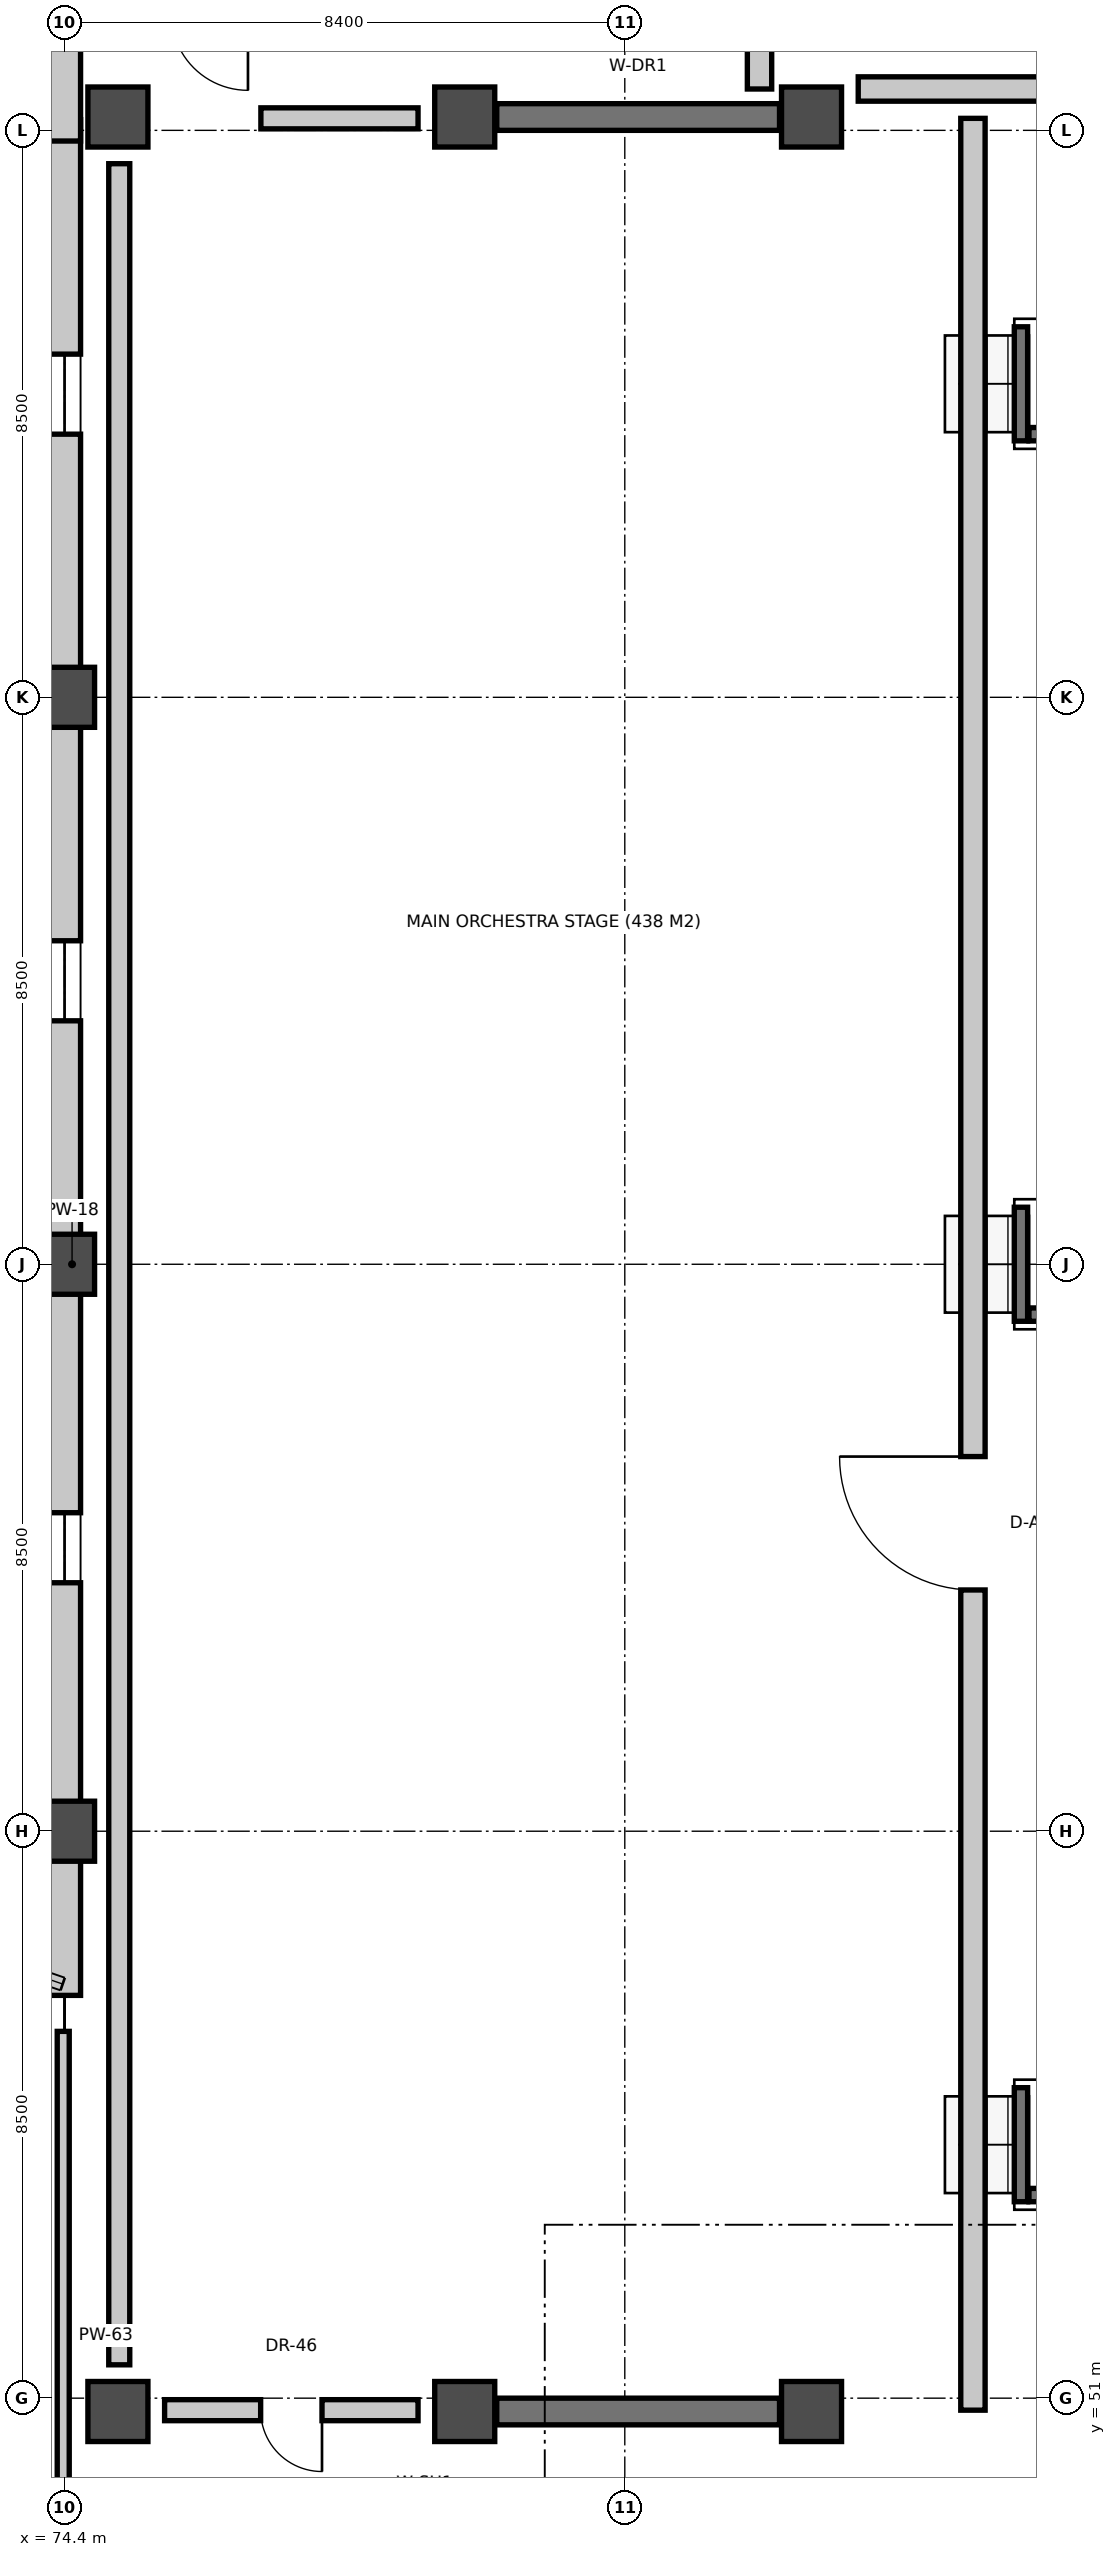
"""IFC4 building model, lengths in metres.
Left out: names, types, materials, properties, quantities, classifications, styles, units other than length and angle.
Written with IfcOpenShell. Run it as: python <this file> out.ifc"""

import sys

from ifc_helpers import new_model, si_unit, direction, frame, frame_2d, origin, origin_2d, place, context, subcontext, project, spatial, rectangle, extrude, element, fill, save


model = new_model("IFC4")
c1 = context("Model", 3, precision=1e-05, world=origin(), true_north=direction((0.0, 1.0)))
c2 = subcontext(c1, "Body", "Model", "MODEL_VIEW")
j1 = project(units=[si_unit("LENGTHUNIT", "METRE"), si_unit("PLANEANGLEUNIT", "RADIAN")], contexts=[c1])
p1 = place(None, origin())
s1 = spatial("IfcSite", under=j1, at=p1, CompositionType="ELEMENT")
p2 = place(p1, origin())
s2 = spatial("IfcBuilding", under=s1, at=p2, CompositionType="ELEMENT")
p3 = place(p2, frame((0.0, 0.0, 5.4)))
s3 = spatial("IfcBuildingStorey", under=s2, at=p3, CompositionType="ELEMENT", Elevation=5.4)
for number, where, z_axis, x_axis in (
    (1, (74.4, 59.5, 0.0), (0.0, 0.0, 1.0), (1.0, 0.0, 0.0)),
    (2, (74.4, 68.0, 0.0), (0.0, 0.0, 1.0), (1.0, 0.0, 0.0)),
    (3, (74.4, 76.5, 0.0), (0.0, 0.0, 1.0), (1.0, 0.0, 0.0)),
    (4, (75.2, 50.8, 0.0), (0.0, 0.0, 1.0), (1.0, 0.0, 0.0)),
    (5, (75.2, 85.2, 0.0), (0.0, 0.0, 1.0), (1.0, 0.0, 0.0)),
    (6, (80.4, 50.8, 0.0), (0.0, 0.0, 1.0), (1.0, 0.0, 0.0)),
    (7, (80.4, 85.2, 0.0), (0.0, 0.0, 1.0), (1.0, 0.0, 0.0)),
    (8, (85.6, 50.8, 0.0), (0.0, 0.0, 1.0), (1.0, 0.0, 0.0)),
    (9, (85.6, 85.2, 0.0), (0.0, 0.0, 1.0), (1.0, 0.0, 0.0)),
):
    element("IfcColumn", number, at=place(p3, frame(where, z_axis=z_axis, x_axis=x_axis)), inside=s3, PredefinedType="COLUMN", context=c2, shape_type="SweptSolid", body=[
        extrude(rectangle(XDim=0.9, YDim=0.9, at=origin_2d()), origin(), (0.0, 0.0, 1.0), 4.8),
    ])
for number, where, z_axis, x_axis in (
    (10, (80.88, 50.8, 0.0), (0.0, 0.0, 1.0), (1.0, 0.0, 0.0)),
    (11, (80.88, 85.2, 0.0), (0.0, 0.0, 1.0), (1.0, 0.0, 0.0)),
):
    element("IfcWall", number, at=place(p3, frame(where, z_axis=z_axis, x_axis=x_axis)), inside=s3, PredefinedType="SHEAR", context=c2, shape_type="SweptSolid", body=[
        extrude(rectangle(XDim=4.24, YDim=0.4, at=frame_2d((2.12, 0.0))), origin(), (0.0, 0.0, 1.0), 3.48),
    ])
p4 = place(p3, frame((68.654, 59.182, 0.0), z_axis=(0.0, 0.0, 1.0), x_axis=(0.945267933336, -0.326295164241, 0.0)))
e12 = element("IfcWall", 12, at=p4, inside=s3, PredefinedType="PARAPET", context=c2, shape_type="SweptSolid", body=[
    extrude(rectangle(XDim=6.079, YDim=0.26, at=frame_2d((3.039, 0.0))), origin(), (0.0, 0.0, 1.0), 1.12),
])
p5 = place(p3, frame((74.4, 57.039, 0.0), z_axis=(0.0, 0.0, 1.0), x_axis=(0.0, 1.0, 0.0)))
e13 = element("IfcWall", 13, at=p5, inside=s3, PredefinedType="SOLIDWALL", context=c2, shape_type="SweptSolid", body=[
    extrude(rectangle(XDim=2.031, YDim=0.48, at=frame_2d((1.016, 0.0))), origin(), (0.0, 0.0, 1.0), 4.53),
])
p6 = place(p3, frame((74.4, 59.93, 0.0), z_axis=(0.0, 0.0, 1.0), x_axis=(0.0, 1.0, 0.0)))
e14 = element("IfcWall", 14, at=p6, inside=s3, PredefinedType="SOLIDWALL", context=c2, shape_type="SweptSolid", body=[
    extrude(rectangle(XDim=7.64, YDim=0.48, at=frame_2d((3.82, 0.0))), origin(), (0.0, 0.0, 1.0), 3.424),
])
p7 = place(p6, frame((3.295, 0.0, 0.95)))
e15 = element("IfcOpeningElement", 15, at=p7, cuts=e14, PredefinedType="OPENING", context=c2, shape_type="SweptSolid", body=[
    extrude(rectangle(XDim=1.05, YDim=1.8, at=frame_2d((0.525, 0.9))), frame((0.0, 0.25, 0.0), z_axis=(0.0, -1.0, 0.0), x_axis=(1.0, 0.0, 0.0)), (0.0, 0.0, 1.0), 0.5),
])
p8 = place(p3, frame((74.4, 68.43, 0.0), z_axis=(0.0, 0.0, 1.0), x_axis=(0.0, 1.0, 0.0)))
e16 = element("IfcWall", 16, at=p8, inside=s3, PredefinedType="SOLIDWALL", context=c2, shape_type="SweptSolid", body=[
    extrude(rectangle(XDim=7.64, YDim=0.48, at=frame_2d((3.82, 0.0))), origin(), (0.0, 0.0, 1.0), 3.736),
])
p9 = place(p8, frame((3.22, 0.0, 0.95)))
e17 = element("IfcOpeningElement", 17, at=p9, cuts=e16, PredefinedType="OPENING", context=c2, shape_type="SweptSolid", body=[
    extrude(rectangle(XDim=1.2, YDim=2.4, at=frame_2d((0.6, 1.2))), frame((0.0, 0.25, 0.0), z_axis=(0.0, -1.0, 0.0), x_axis=(1.0, 0.0, 0.0)), (0.0, 0.0, 1.0), 0.5),
])
p10 = place(p3, frame((74.4, 76.93, 0.0), z_axis=(0.0, 0.0, 1.0), x_axis=(0.0, 1.0, 0.0)))
e18 = element("IfcWall", 18, at=p10, inside=s3, PredefinedType="SOLIDWALL", context=c2, shape_type="SweptSolid", body=[
    extrude(rectangle(XDim=8.23, YDim=0.48, at=frame_2d((4.115, 0.0))), origin(), (0.0, 0.0, 1.0), 4.53),
])
p11 = place(p10, frame((3.515, 0.0, 0.95)))
e19 = element("IfcOpeningElement", 19, at=p11, cuts=e18, PredefinedType="OPENING", context=c2, shape_type="SweptSolid", body=[
    extrude(rectangle(XDim=1.2, YDim=2.4, at=frame_2d((0.6, 1.2))), frame((0.0, 0.25, 0.0), z_axis=(0.0, -1.0, 0.0), x_axis=(1.0, 0.0, 0.0)), (0.0, 0.0, 1.0), 0.5),
])
p12 = place(p3, frame((74.4, 84.84, 0.0), z_axis=(0.0, 0.0, 1.0), x_axis=(0.0, 1.0, 0.0)))
e20 = element("IfcWall", 20, at=p12, inside=s3, PredefinedType="SOLIDWALL", context=c2, shape_type="SweptSolid", body=[
    extrude(rectangle(XDim=8.23, YDim=0.48, at=frame_2d((4.115, 0.0))), origin(), (0.0, 0.0, 1.0), 4.53),
])
p13 = place(p12, frame((3.515, 0.0, 0.95)))
e21 = element("IfcOpeningElement", 21, at=p13, cuts=e20, PredefinedType="OPENING", context=c2, shape_type="SweptSolid", body=[
    extrude(rectangle(XDim=1.2, YDim=2.4, at=frame_2d((0.6, 1.2))), frame((0.0, 0.25, 0.0), z_axis=(0.0, -1.0, 0.0), x_axis=(1.0, 0.0, 0.0)), (0.0, 0.0, 1.0), 0.5),
])
p14 = place(p3, frame((88.74, 53.945, 0.0), z_axis=(0.0, 0.0, 1.0), x_axis=(0.0, 1.0, 0.0)))
e22 = element("IfcWall", 22, at=p14, inside=s3, PredefinedType="SHEAR", context=c2, shape_type="SweptSolid", body=[
    extrude(rectangle(XDim=1.71, YDim=0.2, at=frame_2d((0.855, 0.0))), origin(), (0.0, 0.0, 1.0), 0.225),
])
p15 = place(p3, frame((88.86, 54.045, 0.0), z_axis=(0.0, 0.0, 1.0), x_axis=(1.0, 0.0, 0.0)))
e23 = element("IfcWall", 23, at=p15, inside=s3, PredefinedType="SHEAR", context=c2, shape_type="SweptSolid", body=[
    extrude(rectangle(XDim=0.83, YDim=0.2, at=frame_2d((0.415, 0.0))), origin(), (0.0, 0.0, 1.0), 0.225),
])
p16 = place(p3, frame((88.74, 67.145, 0.0), z_axis=(0.0, 0.0, 1.0), x_axis=(0.0, 1.0, 0.0)))
e24 = element("IfcWall", 24, at=p16, inside=s3, PredefinedType="SHEAR", context=c2, shape_type="SweptSolid", body=[
    extrude(rectangle(XDim=1.71, YDim=0.2, at=frame_2d((0.855, 0.0))), origin(), (0.0, 0.0, 1.0), 0.225),
])
p17 = place(p3, frame((88.86, 67.245, 0.0), z_axis=(0.0, 0.0, 1.0), x_axis=(1.0, 0.0, 0.0)))
e25 = element("IfcWall", 25, at=p17, inside=s3, PredefinedType="SHEAR", context=c2, shape_type="SweptSolid", body=[
    extrude(rectangle(XDim=0.83, YDim=0.2, at=frame_2d((0.415, 0.0))), origin(), (0.0, 0.0, 1.0), 0.225),
])
p18 = place(p3, frame((88.74, 80.345, 0.0), z_axis=(0.0, 0.0, 1.0), x_axis=(0.0, 1.0, 0.0)))
e26 = element("IfcWall", 26, at=p18, inside=s3, PredefinedType="SHEAR", context=c2, shape_type="SweptSolid", body=[
    extrude(rectangle(XDim=1.71, YDim=0.2, at=frame_2d((0.855, 0.0))), origin(), (0.0, 0.0, 1.0), 0.225),
])
p19 = place(p3, frame((88.86, 80.445, 0.0), z_axis=(0.0, 0.0, 1.0), x_axis=(1.0, 0.0, 0.0)))
e27 = element("IfcWall", 27, at=p19, inside=s3, PredefinedType="SHEAR", context=c2, shape_type="SweptSolid", body=[
    extrude(rectangle(XDim=0.83, YDim=0.2, at=frame_2d((0.415, 0.0))), origin(), (0.0, 0.0, 1.0), 0.225),
])
p20 = place(p3, frame((88.02, 50.82, 0.0), z_axis=(0.0, 0.0, 1.0), x_axis=(0.0, 1.0, 0.0)))
e28 = element("IfcWall", 28, at=p20, inside=s3, PredefinedType="PARTITIONING", context=c2, shape_type="SweptSolid", body=[
    extrude(rectangle(XDim=34.36, YDim=0.365, at=frame_2d((17.18, 0.0))), origin(), (0.0, 0.0, 1.0), 3.45),
])
p21 = place(p20, frame((12.297, 0.0, 0.0)))
e29 = element("IfcOpeningElement", 29, at=p21, cuts=e28, PredefinedType="OPENING", context=c2, shape_type="SweptSolid", body=[
    extrude(rectangle(XDim=2.0, YDim=2.4, at=frame_2d((1.0, 1.2))), frame((0.0, 0.192, 0.0), z_axis=(0.0, -1.0, 0.0), x_axis=(1.0, 0.0, 0.0)), (0.0, 0.0, 1.0), 0.385),
])
p22 = place(p3, frame((75.22, 51.5, 0.0), z_axis=(0.0, 0.0, 1.0), x_axis=(0.0, 1.0, 0.0)))
e30 = element("IfcWall", 30, at=p22, inside=s3, PredefinedType="PARTITIONING", context=c2, shape_type="SweptSolid", body=[
    extrude(rectangle(XDim=33.0, YDim=0.315, at=frame_2d((16.5, 0.0))), origin(), (0.0, 0.0, 1.0), 3.45),
])
p23 = place(p3, frame((77.344, 85.18, 0.0), z_axis=(0.0, 0.0, 1.0), x_axis=(1.0, 0.0, 0.0)))
e31 = element("IfcWall", 31, at=p23, inside=s3, PredefinedType="PARTITIONING", context=c2, shape_type="SweptSolid", body=[
    extrude(rectangle(XDim=2.356, YDim=0.315, at=frame_2d((1.178, 0.0))), origin(), (0.0, 0.0, 1.0), 3.45),
])
p24 = place(p3, frame((79.7, 50.82, 0.0), z_axis=(0.0, 0.0, 1.0), x_axis=(-1.0, 0.0, 0.0)))
e32 = element("IfcWall", 32, at=p24, inside=s3, PredefinedType="PARTITIONING", context=c2, shape_type="SweptSolid", body=[
    extrude(rectangle(XDim=3.8, YDim=0.315, at=frame_2d((1.9, 0.0))), origin(), (0.0, 0.0, 1.0), 3.45),
])
p25 = place(p24, frame((1.44, 0.0, 0.0)))
e33 = element("IfcOpeningElement", 33, at=p25, cuts=e32, PredefinedType="OPENING", context=c2, shape_type="SweptSolid", body=[
    extrude(rectangle(XDim=0.92, YDim=2.12, at=frame_2d((0.46, 1.06))), frame((0.0, 0.167, 0.0), z_axis=(0.0, -1.0, 0.0), x_axis=(1.0, 0.0, 0.0)), (0.0, 0.0, 1.0), 0.335),
])
p26 = place(p3, frame((90.1, 85.62, 0.0), z_axis=(0.0, 0.0, 1.0), x_axis=(-1.0, 0.0, 0.0)))
e34 = element("IfcWall", 34, at=p26, inside=s3, PredefinedType="PARTITIONING", context=c2, shape_type="SweptSolid", body=[
    extrude(rectangle(XDim=3.8, YDim=0.365, at=frame_2d((1.9, 0.0))), origin(), (0.0, 0.0, 1.0), 3.45),
])
p27 = place(p3, frame((84.82, 85.62, 0.0), z_axis=(0.0, 0.0, 1.0), x_axis=(0.0, 1.0, 0.0)))
e35 = element("IfcWall", 35, at=p27, inside=s3, PredefinedType="PARTITIONING", context=c2, shape_type="SweptSolid", body=[
    extrude(rectangle(XDim=6.84, YDim=0.365, at=frame_2d((3.42, 0.0))), origin(), (0.0, 0.0, 1.0), 3.45),
])
p28 = place(p3, frame((74.38, 56.499, 0.0), z_axis=(0.0, 0.0, 1.0), x_axis=(0.0, -1.0, 0.0)))
e36 = element("IfcWall", 36, at=p28, inside=s3, PredefinedType="PARTITIONING", context=c2, shape_type="SweptSolid", body=[
    extrude(rectangle(XDim=9.112, YDim=0.18, at=frame_2d((4.556, 0.0))), origin(), (0.0, 0.0, 1.0), 3.45),
])
p29 = place(p7, origin())
e37 = element("IfcWindow", 37, at=p29, inside=s3, PartitioningType="SINGLE_PANEL", PredefinedType="WINDOW", context=c2, shape_type="SweptSolid", body=[
    extrude(rectangle(XDim=1.05, YDim=1.8, at=frame_2d((0.525, 0.9))), frame((0.0, 0.03, 0.0), z_axis=(0.0, -1.0, 0.0), x_axis=(1.0, 0.0, 0.0)), (0.0, 0.0, 1.0), 0.06),
])
fill(e15, e37)
p30 = place(p9, origin())
e38 = element("IfcWindow", 38, at=p30, inside=s3, PartitioningType="SINGLE_PANEL", PredefinedType="WINDOW", context=c2, shape_type="SweptSolid", body=[
    extrude(rectangle(XDim=1.2, YDim=2.4, at=frame_2d((0.6, 1.2))), frame((0.0, 0.03, 0.0), z_axis=(0.0, -1.0, 0.0), x_axis=(1.0, 0.0, 0.0)), (0.0, 0.0, 1.0), 0.06),
])
fill(e17, e38)
p31 = place(p11, origin())
e39 = element("IfcWindow", 39, at=p31, inside=s3, PartitioningType="SINGLE_PANEL", PredefinedType="WINDOW", context=c2, shape_type="SweptSolid", body=[
    extrude(rectangle(XDim=1.2, YDim=2.4, at=frame_2d((0.6, 1.2))), frame((0.0, 0.03, 0.0), z_axis=(0.0, -1.0, 0.0), x_axis=(1.0, 0.0, 0.0)), (0.0, 0.0, 1.0), 0.06),
])
fill(e19, e39)
p32 = place(p21, origin())
e40 = element("IfcDoor", 40, at=p32, inside=s3, OperationType="SINGLE_SWING_RIGHT", PredefinedType="DOOR", context=c2, shape_type="SweptSolid", body=[
    extrude(rectangle(XDim=2.0, YDim=2.4, at=frame_2d((1.0, 1.2))), frame((0.0, 0.025, 0.0), z_axis=(0.0, -1.0, 0.0), x_axis=(1.0, 0.0, 0.0)), (0.0, 0.0, 1.0), 0.05),
])
fill(e29, e40)
p33 = place(p25, origin())
e41 = element("IfcDoor", 41, at=p33, inside=s3, OperationType="SINGLE_SWING_LEFT", PredefinedType="DOOR", context=c2, shape_type="SweptSolid", body=[
    extrude(rectangle(XDim=0.92, YDim=2.12, at=frame_2d((0.46, 1.06))), frame((0.0, 0.025, 0.0), z_axis=(0.0, -1.0, 0.0), x_axis=(1.0, 0.0, 0.0)), (0.0, 0.0, 1.0), 0.05),
])
fill(e33, e41)
save(model, sys.argv[1])
